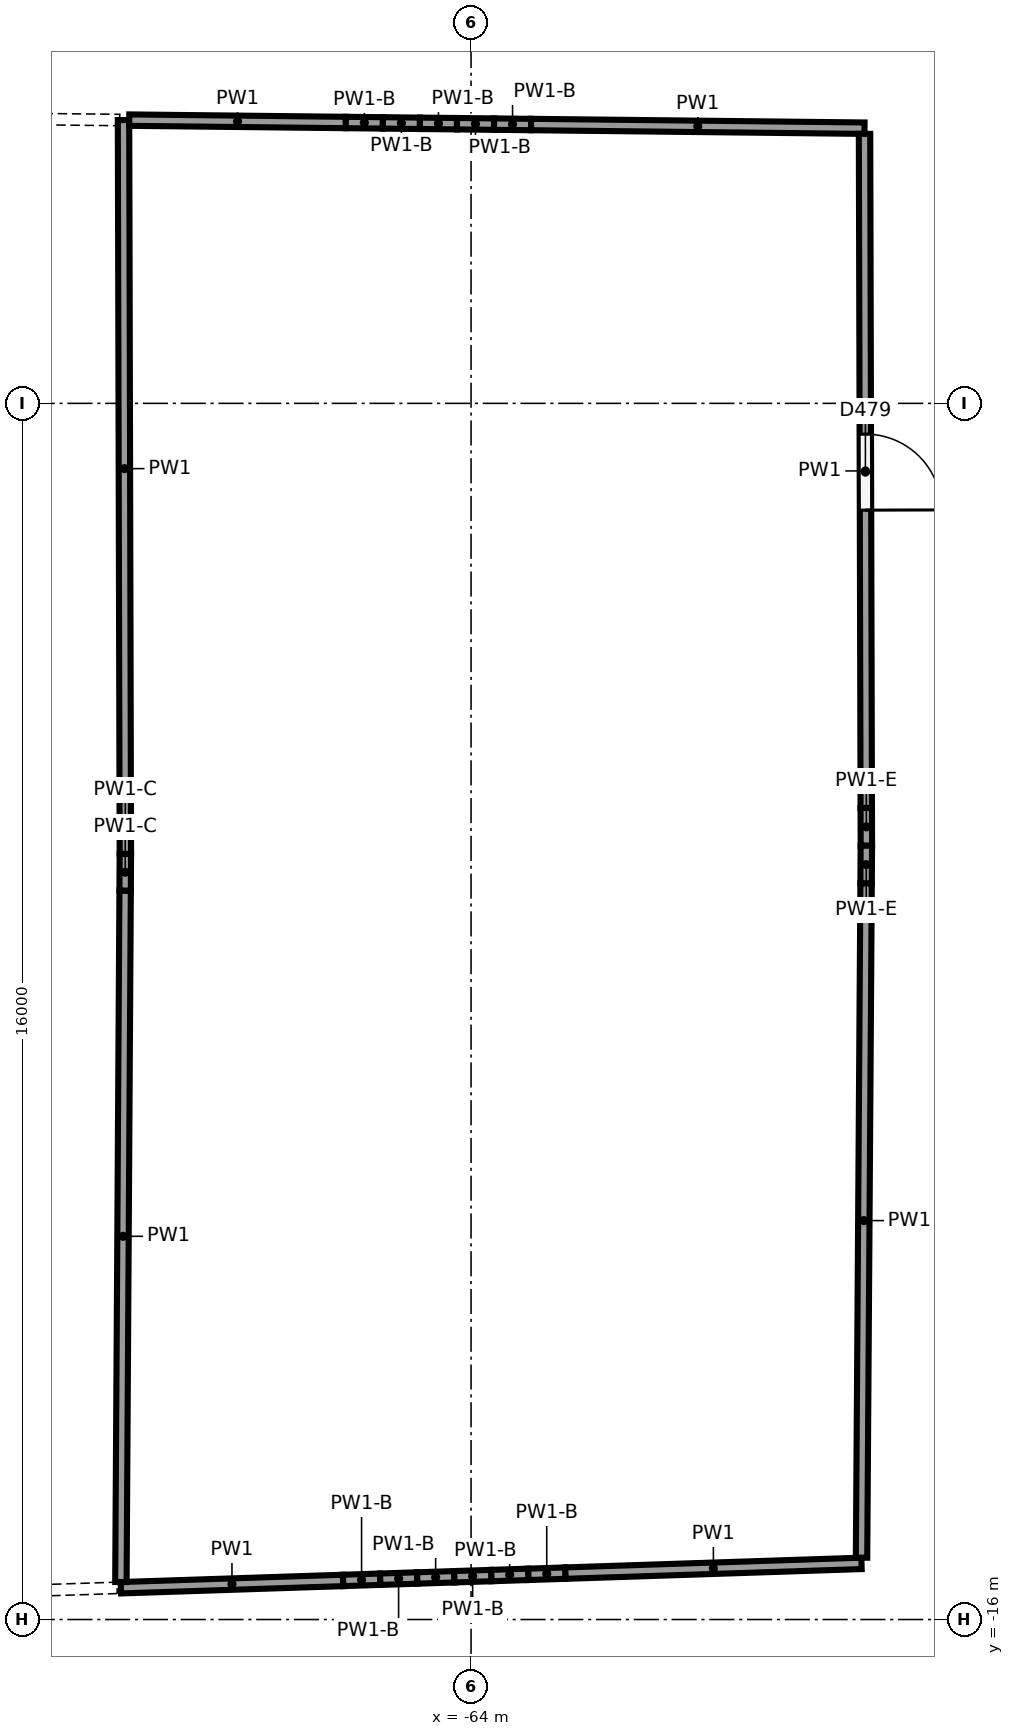
"""IFC4 building model, lengths in metres.
Left out: names, types, materials, properties, quantities, classifications, styles, units other than length and angle.
Written with IfcOpenShell. Run it as: python <this file> out.ifc"""

import sys

from ifc_helpers import new_model, si_unit, direction, frame, frame_2d, origin, origin_2d, place, context, subcontext, project, spatial, rectangle, circle, extrude, element, fill, save


model = new_model("IFC4")
c1 = context("Model", 3, precision=1e-05, world=origin(), true_north=direction((0.0, 1.0)))
c2 = subcontext(c1, "Body", "Model", "MODEL_VIEW")
j1 = project(units=[si_unit("LENGTHUNIT", "METRE"), si_unit("PLANEANGLEUNIT", "RADIAN")], contexts=[c1])
p1 = place(None, origin())
s1 = spatial("IfcSite", under=j1, at=p1, CompositionType="ELEMENT")
p2 = place(p1, origin())
s2 = spatial("IfcBuilding", under=s1, at=p2, CompositionType="ELEMENT")
p3 = place(p2, frame((0.0, 0.0, -4.0)))
s3 = spatial("IfcBuildingStorey", under=s2, at=p3, CompositionType="ELEMENT", Elevation=-4.0)
for number, where, z_axis, x_axis in (
    (1, (-58.399, -5.816, -0.4), (0.0, 0.0, 1.0), (1.0, 0.0, 0.0)),
    (2, (-63.599, -5.873, -0.4), (0.0, 0.0, 1.0), (1.0, 0.0, 0.0)),
):
    element("IfcColumn", number, at=place(p3, frame(where, z_axis=z_axis, x_axis=x_axis)), inside=s3, PredefinedType="COLUMN", context=c2, shape_type="SweptSolid", body=[
        extrude(circle(Radius=0.45, at=origin_2d()), origin(), (0.0, 0.0, 1.0), 4.4),
    ])
p4 = place(p3, frame((-64.899, -5.887, -0.4), z_axis=(0.0, 0.0, 1.0), x_axis=(1.0, 0.0, 0.0)))
e3 = element("IfcColumn", 3, at=p4, inside=s3, PredefinedType="COLUMN", context=c2, shape_type="SweptSolid", body=[
    extrude(circle(Radius=0.4, at=origin_2d()), origin(), (0.0, 0.0, 1.0), 4.4),
])
p5 = place(p3, frame((-58.863, -15.261, 0.0), z_axis=(0.0, 0.0, 1.0), x_axis=(-0.999459745106, -0.032866668724, 0.0)))
e4 = element("IfcWall", 4, at=p5, inside=s3, PredefinedType="PARTITIONING", context=c2, shape_type="SweptSolid", body=[
    extrude(rectangle(XDim=3.9, YDim=0.15, at=frame_2d((1.95, 0.0))), origin(), (0.0, 0.0, 1.0), 3.6),
])
for number, where, z_axis, x_axis in (
    (5, (-62.76, -15.39, 0.0), (0.0, 0.0, 1.0), (-0.999, -0.033, 0.0)),
    (6, (-63.248, -15.406, 0.0), (0.0, 0.0, 1.0), (-0.999, -0.033, 0.0)),
    (7, (-63.735, -15.422, 0.0), (0.0, 0.0, 1.0), (-0.999, -0.033, 0.0)),
):
    element("IfcWall", number, at=place(p3, frame(where, z_axis=z_axis, x_axis=x_axis)), inside=s3, PredefinedType="PARTITIONING", context=c2, shape_type="SweptSolid", body=[
        extrude(rectangle(XDim=0.488, YDim=0.15, at=frame_2d((0.244, 0.0))), origin(), (0.0, 0.0, 1.0), 2.5),
    ])
p6 = place(p3, frame((-64.222, -15.438, 0.0), z_axis=(0.0, 0.0, 1.0), x_axis=(-0.99946964665, -0.032564173951, 0.0)))
e8 = element("IfcWall", 8, at=p6, inside=s3, PredefinedType="PARTITIONING", context=c2, shape_type="SweptSolid", body=[
    extrude(rectangle(XDim=0.487, YDim=0.15, at=frame_2d((0.244, 0.0))), origin(), (0.0, 0.0, 1.0), 2.5),
])
for number, where, z_axis, x_axis in (
    (9, (-64.709, -15.454, 0.0), (0.0, 0.0, 1.0), (-0.999, -0.033, 0.0)),
    (10, (-65.197, -15.47, 0.0), (0.0, 0.0, 1.0), (-0.999, -0.033, 0.0)),
):
    element("IfcWall", number, at=place(p3, frame(where, z_axis=z_axis, x_axis=x_axis)), inside=s3, PredefinedType="PARTITIONING", context=c2, shape_type="SweptSolid", body=[
        extrude(rectangle(XDim=0.488, YDim=0.15, at=frame_2d((0.244, 0.0))), origin(), (0.0, 0.0, 1.0), 2.5),
    ])
p7 = place(p3, frame((-65.684, -15.486, 0.0), z_axis=(0.0, 0.0, 1.0), x_axis=(-0.999461822055, -0.032803448811, 0.0)))
e11 = element("IfcWall", 11, at=p7, inside=s3, PredefinedType="PARTITIONING", context=c2, shape_type="SweptSolid", body=[
    extrude(rectangle(XDim=2.925, YDim=0.15, at=frame_2d((1.462, 0.0))), origin(), (0.0, 0.0, 1.0), 3.6),
])
p8 = place(p3, frame((-68.607, -15.507, 0.0), z_axis=(0.0, 0.0, 1.0), x_axis=(0.006118883866, 0.999981279455, 0.0)))
e12 = element("IfcWall", 12, at=p8, inside=s3, PredefinedType="PARTITIONING", context=c2, shape_type="SweptSolid", body=[
    extrude(rectangle(XDim=9.097, YDim=0.15, at=frame_2d((4.549, 0.0))), origin(), (0.0, 0.0, 1.0), 3.6),
])
p9 = place(p3, frame((-68.551, -6.41, 0.0), z_axis=(0.0, 0.0, 1.0), x_axis=(0.006066622434, 0.999981597877, 0.0)))
e13 = element("IfcWall", 13, at=p9, inside=s3, PredefinedType="PARTITIONING", context=c2, shape_type="SweptSolid", body=[
    extrude(rectangle(XDim=0.483, YDim=0.15, at=frame_2d((0.241, 0.0))), origin(), (0.0, 0.0, 1.0), 2.7),
])
p10 = place(p3, frame((-68.548, -5.927, 0.0), z_axis=(0.0, 0.0, 1.0), x_axis=(-0.002529076383, 0.999996801881, 0.0)))
e14 = element("IfcWall", 14, at=p10, inside=s3, PredefinedType="PARTITIONING", context=c2, shape_type="SweptSolid", body=[
    extrude(rectangle(XDim=0.483, YDim=0.15, at=frame_2d((0.241, 0.0))), origin(), (0.0, 0.0, 1.0), 2.7),
])
p11 = place(p3, frame((-68.55, -5.444, 0.0), z_axis=(0.0, 0.0, 1.0), x_axis=(-0.002502188243, 0.999996869522, 0.0)))
e15 = element("IfcWall", 15, at=p11, inside=s3, PredefinedType="PARTITIONING", context=c2, shape_type="SweptSolid", body=[
    extrude(rectangle(XDim=9.172, YDim=0.15, at=frame_2d((4.586, 0.0))), origin(), (0.0, 0.0, 1.0), 3.6),
])
p12 = place(p3, frame((-68.498, 3.726, 0.0), z_axis=(0.0, 0.0, 1.0), x_axis=(0.999939884591, -0.01096481669, 0.0)))
e16 = element("IfcWall", 16, at=p12, inside=s3, PredefinedType="PARTITIONING", context=c2, shape_type="SweptSolid", body=[
    extrude(rectangle(XDim=2.85, YDim=0.15, at=frame_2d((1.425, 0.0))), origin(), (0.0, 0.0, 1.0), 3.6),
])
for number, where, z_axis, x_axis in (
    (17, (-65.648, 3.695, 0.0), (0.0, 0.0, 1.0), (1.0, -0.011, 0.0)),
    (18, (-65.16, 3.69, 0.0), (0.0, 0.0, 1.0), (1.0, -0.011, 0.0)),
):
    element("IfcWall", number, at=place(p3, frame(where, z_axis=z_axis, x_axis=x_axis)), inside=s3, PredefinedType="PARTITIONING", context=c2, shape_type="SweptSolid", body=[
        extrude(rectangle(XDim=0.488, YDim=0.15, at=frame_2d((0.244, 0.0))), origin(), (0.0, 0.0, 1.0), 2.5),
    ])
p13 = place(p3, frame((-64.673, 3.684, 0.0), z_axis=(0.0, 0.0, 1.0), x_axis=(0.999944658431, -0.010520459833, 0.0)))
e19 = element("IfcWall", 19, at=p13, inside=s3, PredefinedType="PARTITIONING", context=c2, shape_type="SweptSolid", body=[
    extrude(rectangle(XDim=0.487, YDim=0.15, at=frame_2d((0.244, 0.0))), origin(), (0.0, 0.0, 1.0), 2.5),
])
for number, where, z_axis, x_axis in (
    (20, (-64.185, 3.679, 0.0), (0.0, 0.0, 1.0), (1.0, -0.012, 0.0)),
    (21, (-63.698, 3.674, 0.0), (0.0, 0.0, 1.0), (1.0, -0.011, 0.0)),
):
    element("IfcWall", number, at=place(p3, frame(where, z_axis=z_axis, x_axis=x_axis)), inside=s3, PredefinedType="PARTITIONING", context=c2, shape_type="SweptSolid", body=[
        extrude(rectangle(XDim=0.488, YDim=0.15, at=frame_2d((0.244, 0.0))), origin(), (0.0, 0.0, 1.0), 2.5),
    ])
p14 = place(p3, frame((-63.21, 3.668, 0.0), z_axis=(0.0, 0.0, 1.0), x_axis=(0.999939914849, -0.010962056941, 0.0)))
e22 = element("IfcWall", 22, at=p14, inside=s3, PredefinedType="PARTITIONING", context=c2, shape_type="SweptSolid", body=[
    extrude(rectangle(XDim=4.387, YDim=0.15, at=frame_2d((2.194, 0.0))), origin(), (0.0, 0.0, 1.0), 3.6),
])
p15 = place(p3, frame((-58.823, 3.545, 0.0), z_axis=(0.0, 0.0, 1.0), x_axis=(0.002560141365, -0.999996722833, 0.0)))
e23 = element("IfcWall", 23, at=p15, inside=s3, PredefinedType="PARTITIONING", context=c2, shape_type="SweptSolid", body=[
    extrude(rectangle(XDim=8.869, YDim=0.15, at=frame_2d((4.434, 0.0))), origin(), (0.0, 0.0, 1.0), 3.6),
])
p16 = place(p15, frame((3.95, 0.0, 0.0)))
e24 = element("IfcOpeningElement", 24, at=p16, cuts=e23, PredefinedType="OPENING", context=c2, shape_type="SweptSolid", body=[
    extrude(rectangle(XDim=1.0, YDim=2.1, at=frame_2d((0.5, 1.05))), frame((0.0, 0.085, 0.0), z_axis=(0.0, -1.0, 0.0), x_axis=(1.0, 0.0, 0.0)), (0.0, 0.0, 1.0), 0.17),
])
p17 = place(p3, frame((-58.8, -5.323, 0.0), z_axis=(0.0, 0.0, 1.0), x_axis=(0.002946942017, -0.999995657757, 0.0)))
e25 = element("IfcWall", 25, at=p17, inside=s3, PredefinedType="PARTITIONING", context=c2, shape_type="SweptSolid", body=[
    extrude(rectangle(XDim=0.497, YDim=0.15, at=frame_2d((0.249, 0.0))), origin(), (0.0, 0.0, 1.0), 2.85),
])
p18 = place(p3, frame((-58.799, -5.82, 0.0), z_axis=(0.0, 0.0, 1.0), x_axis=(-0.006879444083, -0.999976336345, 0.0)))
e26 = element("IfcWall", 26, at=p18, inside=s3, PredefinedType="PARTITIONING", context=c2, shape_type="SweptSolid", body=[
    extrude(rectangle(XDim=0.497, YDim=0.15, at=frame_2d((0.249, 0.0))), origin(), (0.0, 0.0, 1.0), 2.85),
])
p19 = place(p3, frame((-58.802, -6.317, 0.0), z_axis=(0.0, 0.0, 1.0), x_axis=(-0.006771480952, -0.99997707326, 0.0)))
e27 = element("IfcWall", 27, at=p19, inside=s3, PredefinedType="PARTITIONING", context=c2, shape_type="SweptSolid", body=[
    extrude(rectangle(XDim=8.869, YDim=0.15, at=frame_2d((4.435, 0.0))), origin(), (0.0, 0.0, 1.0), 3.6),
])
for number, where, z_axis, x_axis in (
    (28, (-68.657, -15.583, 0.0), (0.0, 0.0, 1.0), (-0.999, -0.033, 0.0)),
    (29, (-72.979, 3.775, 0.0), (0.0, 0.0, 1.0), (1.0, -0.011, 0.0)),
):
    element("IfcWall", number, at=place(p3, frame(where, z_axis=z_axis, x_axis=x_axis)), inside=s3, PredefinedType="PARTITIONING", context=c2, shape_type="SweptSolid", body=[
        extrude(rectangle(XDim=4.357, YDim=0.15, at=frame_2d((2.178, 0.0))), origin(), (0.0, 0.0, 1.0), 3.6),
    ])
p20 = place(p16, origin())
e30 = element("IfcDoor", 30, at=p20, inside=s3, OperationType="SINGLE_SWING_RIGHT", PredefinedType="DOOR", context=c2, shape_type="SweptSolid", body=[
    extrude(rectangle(XDim=1.0, YDim=2.1, at=frame_2d((0.5, 1.05))), frame((0.0, 0.025, 0.0), z_axis=(0.0, -1.0, 0.0), x_axis=(1.0, 0.0, 0.0)), (0.0, 0.0, 1.0), 0.05),
])
fill(e24, e30)
save(model, sys.argv[1])
